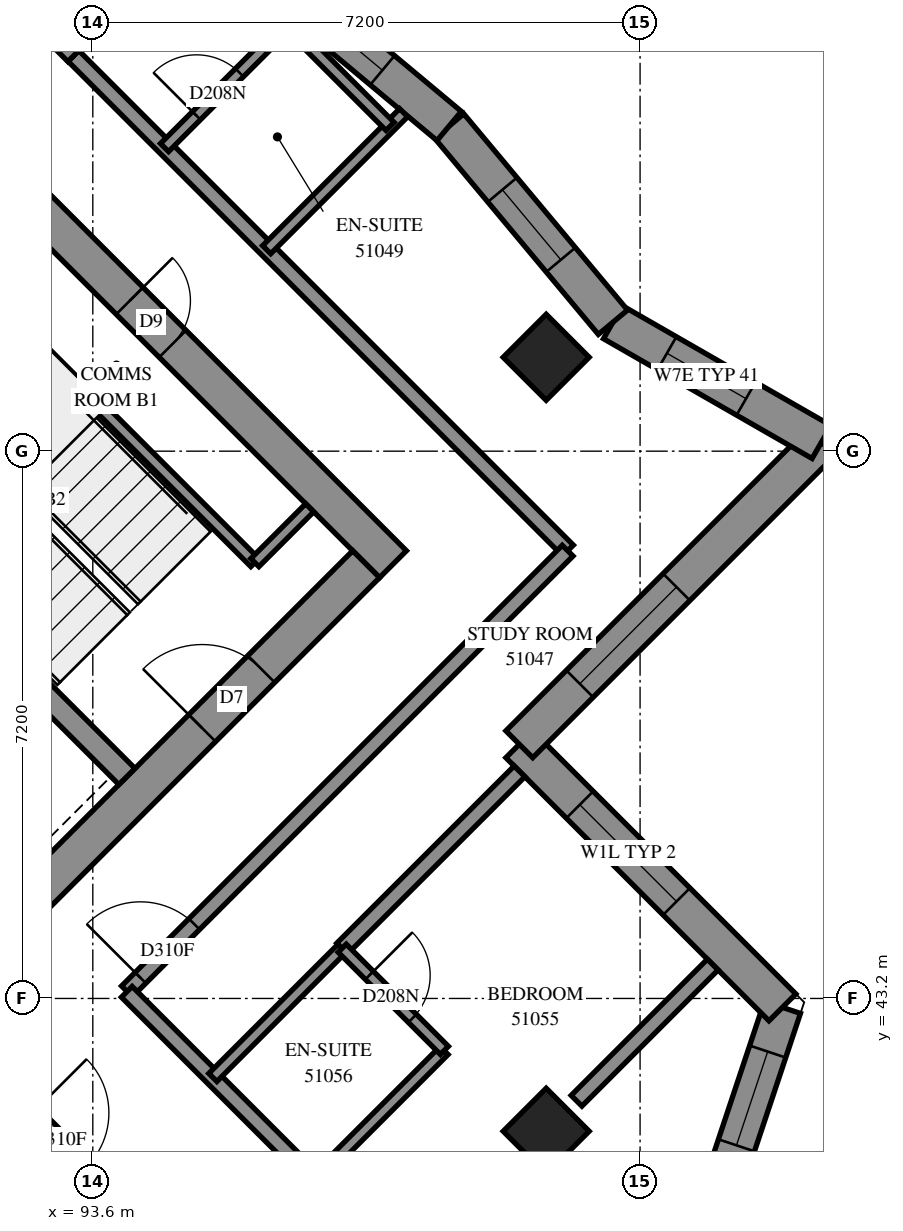
"""IFC4 building model, lengths in metres.
Left out: names, types, materials, properties, quantities, classifications, styles, units other than length and angle.
Written with IfcOpenShell. Run it as: python <this file> out.ifc"""

import sys

from ifc_helpers import new_model, si_unit, direction, frame, frame_2d, origin, origin_2d, place, context, subcontext, project, spatial, polyline, rectangle, outline, extrude, element, fill, save


model = new_model("IFC4")
c1 = context("Model", 3, precision=1e-05, world=origin(), true_north=direction((0.0, 1.0)))
c2 = subcontext(c1, "Body", "Model", "MODEL_VIEW")
j1 = project(units=[si_unit("LENGTHUNIT", "METRE"), si_unit("PLANEANGLEUNIT", "RADIAN")], contexts=[c1])
p1 = place(None, origin())
s1 = spatial("IfcSite", under=j1, at=p1, CompositionType="ELEMENT")
p2 = place(p1, origin())
s2 = spatial("IfcBuilding", under=s1, at=p2, CompositionType="ELEMENT")
p3 = place(p2, frame((0.0, 0.0, 189.6)))
s3 = spatial("IfcBuildingStorey", under=s2, at=p3, CompositionType="ELEMENT", Elevation=189.6)
for number, where, z_axis, x_axis in (
    (1, (99.565, 51.635, 0.0), (0.0, 0.0, 1.0), (0.707, -0.707, 0.0)),
    (2, (99.565, 41.453, 0.0), (0.0, 0.0, 1.0), (0.707, -0.707, 0.0)),
):
    element("IfcColumn", number, at=place(p3, frame(where, z_axis=z_axis, x_axis=x_axis)), inside=s3, PredefinedType="COLUMN", context=c2, shape_type="SweptSolid", body=[
        extrude(rectangle(XDim=0.8, YDim=0.8, at=origin_2d()), origin(), (0.0, 0.0, 1.0), 3.1),
    ])
p4 = place(p3, frame((86.66, 59.802, -0.3), z_axis=(0.0, 0.0, 1.0), x_axis=(0.7071067812, -0.7071067812, 0.0)))
e3 = element("IfcWall", 3, at=p4, inside=s3, PredefinedType="SHEAR", context=c2, shape_type="SweptSolid", body=[
    extrude(rectangle(XDim=15.4, YDim=0.5, at=frame_2d((7.7, 0.0))), origin(), (0.0, 0.0, 1.0), 2.7),
])
p5 = place(p4, frame((10.5, 0.0, 0.3)))
e4 = element("IfcOpeningElement", 4, at=p5, cuts=e3, PredefinedType="OPENING", context=c2, shape_type="SweptSolid", body=[
    extrude(rectangle(XDim=0.8, YDim=2.1, at=frame_2d((0.4, 1.05))), frame((0.0, 0.26, 0.0), z_axis=(0.0, -1.0, 0.0), x_axis=(1.0, 0.0, 0.0)), (0.0, 0.0, 1.0), 0.52),
])
p6 = place(p3, frame((87.013, 38.731, -0.3), z_axis=(0.0, 0.0, 1.0), x_axis=(0.7071067812, 0.7071067812, 0.0)))
e5 = element("IfcWall", 5, at=p6, inside=s3, PredefinedType="SHEAR", context=c2, shape_type="SweptSolid", body=[
    extrude(rectangle(XDim=14.4, YDim=0.5, at=frame_2d((7.2, 0.0))), origin(), (0.0, 0.0, 1.0), 2.7),
])
p7 = place(p6, frame((4.55, 0.0, 0.3)))
e6 = element("IfcOpeningElement", 6, at=p7, cuts=e5, PredefinedType="OPENING", context=c2, shape_type="SweptSolid", body=[
    extrude(rectangle(XDim=1.1, YDim=2.1, at=frame_2d((0.55, 1.05))), frame((0.0, 0.26, 0.0), z_axis=(0.0, -1.0, 0.0), x_axis=(1.0, 0.0, 0.0)), (0.0, 0.0, 1.0), 0.52),
])
p8 = place(p6, frame((11.35, 0.0, 0.3)))
e7 = element("IfcOpeningElement", 7, at=p8, cuts=e5, PredefinedType="OPENING", context=c2, shape_type="SweptSolid", body=[
    extrude(rectangle(XDim=1.1, YDim=2.1, at=frame_2d((0.55, 1.05))), frame((0.0, 0.26, 0.0), z_axis=(0.0, -1.0, 0.0), x_axis=(1.0, 0.0, 0.0)), (0.0, 0.0, 1.0), 0.52),
])
p9 = place(p3, frame((88.958, 51.211, 0.0), z_axis=(0.0, 0.0, 1.0), x_axis=(0.7070998367, -0.7071137256, 0.0)))
e8 = element("IfcWall", 8, at=p9, inside=s3, PredefinedType="SOLIDWALL", context=c2, shape_type="SweptSolid", body=[
    extrude(rectangle(XDim=7.2, YDim=0.3, at=frame_2d((3.6, 0.0))), origin(), (0.0, 0.0, 1.0), 3.1),
])
p10 = place(p3, frame((101.062, 38.252, 0.0), z_axis=(0.0, 0.0, 1.0), x_axis=(0.3162395484, 0.9486793705, 0.0)))
e9 = element("IfcWall", 9, at=p10, inside=s3, PredefinedType="SOLIDWALL", context=c2, shape_type="SweptSolid", body=[
    extrude(outline(polyline([(-0.12, -0.25), (5.247, -0.25), (4.938, 0.25), (0.12, 0.25), (-0.12, -0.25)])), origin(), (0.0, 0.0, 1.0), 3.1),
])
p11 = place(p10, frame((1.68, 0.0, 0.45)))
e10 = element("IfcOpeningElement", 10, at=p11, cuts=e9, PredefinedType="OPENING", context=c2, shape_type="SweptSolid", body=[
    extrude(rectangle(XDim=1.3, YDim=2.5, at=frame_2d((0.65, 1.25))), frame((0.0, 0.26, 0.0), z_axis=(0.0, -1.0, 0.0), x_axis=(1.0, 0.0, 0.0)), (0.0, 0.0, 1.0), 0.52),
])
p12 = place(p10, frame((3.18, 0.0, 0.45)))
e11 = element("IfcOpeningElement", 11, at=p12, cuts=e9, PredefinedType="OPENING", context=c2, shape_type="SweptSolid", body=[
    extrude(rectangle(XDim=1.3, YDim=2.5, at=frame_2d((0.65, 1.25))), frame((0.0, 0.26, 0.0), z_axis=(0.0, -1.0, 0.0), x_axis=(1.0, 0.0, 0.0)), (0.0, 0.0, 1.0), 0.52),
])
p13 = place(p3, frame((102.673, 43.083, 0.0), z_axis=(0.0, 0.0, 1.0), x_axis=(-0.7071067812, 0.7071067812, 0.0)))
e12 = element("IfcWall", 12, at=p13, inside=s3, PredefinedType="SOLIDWALL", context=c2, shape_type="SweptSolid", body=[
    extrude(outline(polyline([(-0.154, -0.25), (4.646, -0.25), (5.146, 0.25), (0.154, 0.25), (-0.154, -0.25)])), origin(), (0.0, 0.0, 1.0), 3.1),
])
p14 = place(p13, frame((1.97, 0.0, 0.6)))
e13 = element("IfcOpeningElement", 13, at=p14, cuts=e12, PredefinedType="OPENING", context=c2, shape_type="SweptSolid", body=[
    extrude(rectangle(XDim=1.8, YDim=1.9, at=frame_2d((0.9, 0.95))), frame((0.0, 0.26, 0.0), z_axis=(0.0, -1.0, 0.0), x_axis=(1.0, 0.0, 0.0)), (0.0, 0.0, 1.0), 0.52),
])
p15 = place(p3, frame((99.211, 46.544, 0.0), z_axis=(0.0, 0.0, 1.0), x_axis=(0.7071156725, 0.7070978897, 0.0)))
e14 = element("IfcWall", 14, at=p15, inside=s3, PredefinedType="SOLIDWALL", context=c2, shape_type="SweptSolid", body=[
    extrude(outline(polyline([(0.25, -0.25), (5.95, -0.25), (5.297, 0.25), (-0.25, 0.25), (0.25, -0.25)])), origin(), (0.0, 0.0, 1.0), 3.1),
])
p16 = place(p15, frame((1.125, 0.0, 0.6)))
e15 = element("IfcOpeningElement", 15, at=p16, cuts=e14, PredefinedType="OPENING", context=c2, shape_type="SweptSolid", body=[
    extrude(rectangle(XDim=1.8, YDim=1.9, at=frame_2d((0.9, 0.95))), frame((0.0, 0.26, 0.0), z_axis=(0.0, -1.0, 0.0), x_axis=(1.0, 0.0, 0.0)), (0.0, 0.0, 1.0), 0.52),
])
p17 = place(p3, frame((103.188, 50.52, 0.0), z_axis=(0.0, 0.0, 1.0), x_axis=(-0.8672184807, 0.4979278127, 0.0)))
e16 = element("IfcWall", 16, at=p17, inside=s3, PredefinedType="SOLIDWALL", context=c2, shape_type="SweptSolid", body=[
    extrude(outline(polyline([(-0.327, -0.25), (3.12, -0.25), (3.209, 0.25), (0.327, 0.25), (-0.327, -0.25)])), origin(), (0.0, 0.0, 1.0), 3.1),
])
p18 = place(p17, frame((1.146, 0.0, 0.45)))
e17 = element("IfcOpeningElement", 17, at=p18, cuts=e16, PredefinedType="OPENING", context=c2, shape_type="SweptSolid", body=[
    extrude(rectangle(XDim=1.2, YDim=2.5, at=frame_2d((0.6, 1.25))), frame((0.0, 0.26, 0.0), z_axis=(0.0, -1.0, 0.0), x_axis=(1.0, 0.0, 0.0)), (0.0, 0.0, 1.0), 0.52),
])
p19 = place(p3, frame((100.443, 52.096, 0.0), z_axis=(0.0, 0.0, 1.0), x_axis=(-0.6407429217, 0.7677555003, 0.0)))
e18 = element("IfcWall", 18, at=p19, inside=s3, PredefinedType="SOLIDWALL", context=c2, shape_type="SweptSolid", body=[
    extrude(outline(polyline([(0.045, -0.25), (3.385, -0.25), (3.34, 0.25), (-0.045, 0.25), (0.045, -0.25)])), origin(), (0.0, 0.0, 1.0), 3.1),
])
p20 = place(p19, frame((1.07, 0.0, 0.45)))
e19 = element("IfcOpeningElement", 19, at=p20, cuts=e18, PredefinedType="OPENING", context=c2, shape_type="SweptSolid", body=[
    extrude(rectangle(XDim=1.2, YDim=2.5, at=frame_2d((0.6, 1.25))), frame((0.0, 0.26, 0.0), z_axis=(0.0, -1.0, 0.0), x_axis=(1.0, 0.0, 0.0)), (0.0, 0.0, 1.0), 0.52),
])
p21 = place(p3, frame((98.288, 54.678, 0.0), z_axis=(0.0, 0.0, 1.0), x_axis=(-0.7677573222, 0.6407407387, 0.0)))
e20 = element("IfcWall", 20, at=p21, inside=s3, PredefinedType="SOLIDWALL", context=c2, shape_type="SweptSolid", body=[
    extrude(outline(polyline([(-0.022, -0.25), (3.318, -0.25), (3.363, 0.25), (0.022, 0.25), (-0.022, -0.25)])), origin(), (0.0, 0.0, 1.0), 3.1),
])
p22 = place(p21, frame((1.144, 0.0, 0.45)))
e21 = element("IfcOpeningElement", 21, at=p22, cuts=e20, PredefinedType="OPENING", context=c2, shape_type="SweptSolid", body=[
    extrude(rectangle(XDim=1.2, YDim=2.5, at=frame_2d((0.6, 1.25))), frame((0.0, 0.26, 0.0), z_axis=(0.0, -1.0, 0.0), x_axis=(1.0, 0.0, 0.0)), (0.0, 0.0, 1.0), 0.52),
])
p23 = place(p3, frame((91.313, 53.354, 0.0), z_axis=(0.0, 0.0, 1.0), x_axis=(0.7071147811, -0.7070987812, 0.0)))
e22 = element("IfcWall", 22, at=p23, inside=s3, PredefinedType="PARTITIONING", context=c2, shape_type="SweptSolid", body=[
    extrude(rectangle(XDim=6.25, YDim=0.15, at=frame_2d((3.125, 0.0))), origin(), (0.0, 0.0, 1.0), 3.1),
])
p24 = place(p3, frame((95.732, 48.934, 0.0), z_axis=(0.0, 0.0, 1.0), x_axis=(0.7071067812, 0.7071067812, 0.0)))
e23 = element("IfcWall", 23, at=p24, inside=s3, PredefinedType="PARTITIONING", context=c2, shape_type="SweptSolid", body=[
    extrude(rectangle(XDim=1.02, YDim=0.15, at=frame_2d((0.51, 0.0))), origin(), (0.0, 0.0, 1.0), 3.1),
])
p25 = place(p3, frame((93.346, 55.599, 0.0), z_axis=(0.0, 0.0, 1.0), x_axis=(0.7071067812, -0.7071067812, 0.0)))
e24 = element("IfcWall", 24, at=p25, inside=s3, PredefinedType="PARTITIONING", context=c2, shape_type="SweptSolid", body=[
    extrude(rectangle(XDim=9.201, YDim=0.2, at=frame_2d((4.601, 0.0))), origin(), (0.0, 0.0, 1.0), 3.1),
])
p26 = place(p3, frame((94.049, 43.293, 0.0), z_axis=(0.0, 0.0, 1.0), x_axis=(0.7071067812, 0.7071067812, 0.0)))
e25 = element("IfcWall", 25, at=p26, inside=s3, PredefinedType="PARTITIONING", context=c2, shape_type="SweptSolid", body=[
    extrude(rectangle(XDim=8.2, YDim=0.2, at=frame_2d((4.1, 0.0))), origin(), (0.0, 0.0, 1.0), 3.1),
])
p27 = place(p26, frame((0.252, 0.0, 0.0)))
e26 = element("IfcOpeningElement", 26, at=p27, cuts=e25, PredefinedType="OPENING", context=c2, shape_type="SweptSolid", body=[
    extrude(rectangle(XDim=1.0, YDim=2.1, at=frame_2d((0.5, 1.05))), frame((0.0, 0.11, 0.0), z_axis=(0.0, -1.0, 0.0), x_axis=(1.0, 0.0, 0.0)), (0.0, 0.0, 1.0), 0.22),
])
p28 = place(p3, frame((94.047, 43.287, 0.0), z_axis=(0.0, 0.0, 1.0), x_axis=(0.7071067812, -0.7071067812, 0.0)))
e27 = element("IfcWall", 27, at=p28, inside=s3, PredefinedType="PARTITIONING", context=c2, shape_type="SweptSolid", body=[
    extrude(rectangle(XDim=5.199, YDim=0.2, at=frame_2d((2.599, 0.0))), origin(), (0.0, 0.0, 1.0), 3.1),
])
p29 = place(p28, frame((3.898, 0.0, 0.0)))
e28 = element("IfcOpeningElement", 28, at=p29, cuts=e27, PredefinedType="OPENING", context=c2, shape_type="SweptSolid", body=[
    extrude(rectangle(XDim=0.9, YDim=2.1, at=frame_2d((0.45, 1.05))), frame((0.0, 0.11, 0.0), z_axis=(0.0, -1.0, 0.0), x_axis=(1.0, 0.0, 0.0)), (0.0, 0.0, 1.0), 0.22),
])
p30 = place(p3, frame((92.633, 41.873, 0.0), z_axis=(0.0, 0.0, 1.0), x_axis=(0.7071067812, -0.7071067812, 0.0)))
e29 = element("IfcWall", 29, at=p30, inside=s3, PredefinedType="PARTITIONING", context=c2, shape_type="SweptSolid", body=[
    extrude(rectangle(XDim=5.199, YDim=0.2, at=frame_2d((2.599, 0.0))), origin(), (0.0, 0.0, 1.0), 3.1),
])
p31 = place(p30, frame((0.253, 0.0, 0.0)))
e30 = element("IfcOpeningElement", 30, at=p31, cuts=e29, PredefinedType="OPENING", context=c2, shape_type="SweptSolid", body=[
    extrude(rectangle(XDim=1.0, YDim=2.1, at=frame_2d((0.5, 1.05))), frame((0.0, 0.11, 0.0), z_axis=(0.0, -1.0, 0.0), x_axis=(1.0, 0.0, 0.0)), (0.0, 0.0, 1.0), 0.22),
])
p32 = place(p30, frame((3.948, 0.0, 0.0)))
e31 = element("IfcOpeningElement", 31, at=p32, cuts=e29, PredefinedType="OPENING", context=c2, shape_type="SweptSolid", body=[
    extrude(rectangle(XDim=0.9, YDim=2.1, at=frame_2d((0.45, 1.05))), frame((0.0, 0.11, 0.0), z_axis=(0.0, -1.0, 0.0), x_axis=(1.0, 0.0, 0.0)), (0.0, 0.0, 1.0), 0.22),
])
p33 = place(p3, frame((96.88, 43.856, 0.0), z_axis=(0.0, 0.0, 1.0), x_axis=(0.7074098182, 0.7068036142, 0.0)))
e32 = element("IfcWall", 32, at=p33, inside=s3, PredefinedType="PARTITIONING", context=c2, shape_type="SweptSolid", body=[
    extrude(rectangle(XDim=3.299, YDim=0.2, at=frame_2d((1.65, 0.0))), origin(), (0.0, 0.0, 1.0), 3.1),
])
p34 = place(p3, frame((95.887, 53.051, 0.0), z_axis=(0.0, 0.0, 1.0), x_axis=(0.7071067812, 0.7071067812, 0.0)))
e33 = element("IfcWall", 33, at=p34, inside=s3, PredefinedType="PARTITIONING", context=c2, shape_type="SweptSolid", body=[
    extrude(rectangle(XDim=2.548, YDim=0.15, at=frame_2d((1.274, 0.0))), origin(), (0.0, 0.0, 1.0), 3.1),
])
p35 = place(p3, frame((99.964, 41.854, 0.0), z_axis=(0.0, 0.0, 1.0), x_axis=(0.7071265121, 0.7070870497, 0.0)))
e34 = element("IfcWall", 34, at=p35, inside=s3, PredefinedType="PARTITIONING", context=c2, shape_type="SweptSolid", body=[
    extrude(rectangle(XDim=2.534, YDim=0.2, at=frame_2d((1.267, 0.0))), origin(), (0.0, 0.0, 1.0), 3.1),
])
for number, where, z_axis, x_axis in (
    (35, (96.523, 40.817, 0.0), (0.0, 0.0, 1.0), (0.707, 0.707, 0.0)),
    (36, (95.179, 42.161, 0.0), (0.0, 0.0, 1.0), (0.707, 0.707, 0.0)),
):
    element("IfcWall", number, at=place(p3, frame(where, z_axis=z_axis, x_axis=x_axis)), inside=s3, PredefinedType="PARTITIONING", context=c2, shape_type="SweptSolid", body=[
        extrude(rectangle(XDim=2.401, YDim=0.15, at=frame_2d((1.201, 0.0))), origin(), (0.0, 0.0, 1.0), 3.1),
    ])
p36 = place(p3, frame((94.544, 54.394, 0.0), z_axis=(0.0, 0.0, 1.0), x_axis=(0.7070857442, 0.7071278176, 0.0)))
e37 = element("IfcWall", 37, at=p36, inside=s3, PredefinedType="PARTITIONING", context=c2, shape_type="SweptSolid", body=[
    extrude(rectangle(XDim=2.377, YDim=0.15, at=frame_2d((1.188, 0.0))), origin(), (0.0, 0.0, 1.0), 3.1),
])
p37 = place(p36, frame((0.594, 0.0, 0.0)))
e38 = element("IfcOpeningElement", 38, at=p37, cuts=e37, PredefinedType="OPENING", context=c2, shape_type="SweptSolid", body=[
    extrude(rectangle(XDim=0.8, YDim=2.1, at=frame_2d((0.4, 1.05))), frame((0.0, 0.085, 0.0), z_axis=(0.0, -1.0, 0.0), x_axis=(1.0, 0.0, 0.0)), (0.0, 0.0, 1.0), 0.17),
])
p38 = place(p3, frame((96.881, 43.861, 0.0), z_axis=(0.0, 0.0, 1.0), x_axis=(0.7071067812, -0.7071067812, 0.0)))
e39 = element("IfcWall", 39, at=p38, inside=s3, PredefinedType="PARTITIONING", context=c2, shape_type="SweptSolid", body=[
    extrude(rectangle(XDim=1.901, YDim=0.15, at=frame_2d((0.95, 0.0))), origin(), (0.0, 0.0, 1.0), 3.1),
])
p39 = place(p38, frame((0.505, 0.0, 0.0)))
e40 = element("IfcOpeningElement", 40, at=p39, cuts=e39, PredefinedType="OPENING", context=c2, shape_type="SweptSolid", body=[
    extrude(rectangle(XDim=0.8, YDim=2.1, at=frame_2d((0.4, 1.05))), frame((0.0, 0.085, 0.0), z_axis=(0.0, -1.0, 0.0), x_axis=(1.0, 0.0, 0.0)), (0.0, 0.0, 1.0), 0.17),
])
p40 = place(p3, frame((96.191, 55.993, 0.0), z_axis=(0.0, 0.0, 1.0), x_axis=(0.7071067812, -0.7071067812, 0.0)))
e41 = element("IfcWall", 41, at=p40, inside=s3, PredefinedType="PARTITIONING", context=c2, shape_type="SweptSolid", body=[
    extrude(rectangle(XDim=1.867, YDim=0.15, at=frame_2d((0.933, 0.0))), origin(), (0.0, 0.0, 1.0), 3.1),
])
p41 = place(p3, frame((92.311, 56.627, 0.0), z_axis=(0.0, 0.0, 1.0), x_axis=(0.7077922938, -0.7064206033, 0.0)))
e42 = element("IfcWall", 42, at=p41, inside=s3, PredefinedType="PARTITIONING", context=c2, shape_type="SweptSolid", body=[
    extrude(rectangle(XDim=1.458, YDim=0.2, at=frame_2d((0.729, 0.0))), origin(), (0.0, 0.0, 1.0), 3.1),
])
p42 = place(p12, origin())
e43 = element("IfcWindow", 43, at=p42, inside=s3, PartitioningType="SINGLE_PANEL", PredefinedType="WINDOW", context=c2, shape_type="SweptSolid", body=[
    extrude(rectangle(XDim=1.3, YDim=2.5, at=frame_2d((0.65, 1.25))), frame((0.0, 0.18, 0.0), z_axis=(0.0, -1.0, 0.0), x_axis=(1.0, 0.0, 0.0)), (0.0, 0.0, 1.0), 0.06),
])
fill(e11, e43)
p43 = place(p14, origin())
e44 = element("IfcWindow", 44, at=p43, inside=s3, PartitioningType="SINGLE_PANEL", PredefinedType="WINDOW", context=c2, shape_type="SweptSolid", body=[
    extrude(rectangle(XDim=1.8, YDim=1.9, at=frame_2d((0.9, 0.95))), frame((0.0, 0.18, 0.0), z_axis=(0.0, -1.0, 0.0), x_axis=(1.0, 0.0, 0.0)), (0.0, 0.0, 1.0), 0.06),
])
fill(e13, e44)
p44 = place(p16, origin())
e45 = element("IfcWindow", 45, at=p44, inside=s3, PartitioningType="SINGLE_PANEL", PredefinedType="WINDOW", context=c2, shape_type="SweptSolid", body=[
    extrude(rectangle(XDim=1.8, YDim=1.9, at=frame_2d((0.9, 0.95))), frame((0.0, 0.18, 0.0), z_axis=(0.0, -1.0, 0.0), x_axis=(1.0, 0.0, 0.0)), (0.0, 0.0, 1.0), 0.06),
])
fill(e15, e45)
p45 = place(p18, origin())
e46 = element("IfcWindow", 46, at=p45, inside=s3, PartitioningType="SINGLE_PANEL", PredefinedType="WINDOW", context=c2, shape_type="SweptSolid", body=[
    extrude(rectangle(XDim=1.2, YDim=2.5, at=frame_2d((0.6, 1.25))), frame((0.0, 0.18, 0.0), z_axis=(0.0, -1.0, 0.0), x_axis=(1.0, 0.0, 0.0)), (0.0, 0.0, 1.0), 0.06),
])
fill(e17, e46)
p46 = place(p20, origin())
e47 = element("IfcWindow", 47, at=p46, inside=s3, PartitioningType="SINGLE_PANEL", PredefinedType="WINDOW", context=c2, shape_type="SweptSolid", body=[
    extrude(rectangle(XDim=1.2, YDim=2.5, at=frame_2d((0.6, 1.25))), frame((0.0, 0.18, 0.0), z_axis=(0.0, -1.0, 0.0), x_axis=(1.0, 0.0, 0.0)), (0.0, 0.0, 1.0), 0.06),
])
fill(e19, e47)
p47 = place(p22, origin())
e48 = element("IfcWindow", 48, at=p47, inside=s3, PartitioningType="SINGLE_PANEL", PredefinedType="WINDOW", context=c2, shape_type="SweptSolid", body=[
    extrude(rectangle(XDim=1.2, YDim=2.5, at=frame_2d((0.6, 1.25))), frame((0.0, 0.18, 0.0), z_axis=(0.0, -1.0, 0.0), x_axis=(1.0, 0.0, 0.0)), (0.0, 0.0, 1.0), 0.06),
])
fill(e21, e48)
p48 = place(p5, origin())
e49 = element("IfcDoor", 49, at=p48, inside=s3, OperationType="SINGLE_SWING_RIGHT", PredefinedType="DOOR", context=c2, shape_type="SweptSolid", body=[
    extrude(rectangle(XDim=0.8, YDim=2.1, at=frame_2d((0.4, 1.05))), frame((0.0, 0.025, 0.0), z_axis=(0.0, -1.0, 0.0), x_axis=(1.0, 0.0, 0.0)), (0.0, 0.0, 1.0), 0.05),
])
fill(e4, e49)
p49 = place(p8, origin())
e50 = element("IfcDoor", 50, at=p49, inside=s3, OperationType="SINGLE_SWING_RIGHT", PredefinedType="DOOR", context=c2, shape_type="SweptSolid", body=[
    extrude(rectangle(XDim=1.1, YDim=2.1, at=frame_2d((0.55, 1.05))), frame((0.0, 0.025, 0.0), z_axis=(0.0, -1.0, 0.0), x_axis=(1.0, 0.0, 0.0)), (0.0, 0.0, 1.0), 0.05),
])
fill(e7, e50)
p50 = place(p27, origin())
e51 = element("IfcDoor", 51, at=p50, inside=s3, OperationType="SINGLE_SWING_RIGHT", PredefinedType="DOOR", context=c2, shape_type="SweptSolid", body=[
    extrude(rectangle(XDim=1.0, YDim=2.1, at=frame_2d((0.5, 1.05))), frame((0.0, 0.025, 0.0), z_axis=(0.0, -1.0, 0.0), x_axis=(1.0, 0.0, 0.0)), (0.0, 0.0, 1.0), 0.05),
])
fill(e26, e51)
p51 = place(p37, origin())
e52 = element("IfcDoor", 52, at=p51, inside=s3, OperationType="SINGLE_SWING_RIGHT", PredefinedType="DOOR", context=c2, shape_type="SweptSolid", body=[
    extrude(rectangle(XDim=0.8, YDim=2.1, at=frame_2d((0.4, 1.05))), frame((0.0, 0.025, 0.0), z_axis=(0.0, -1.0, 0.0), x_axis=(1.0, 0.0, 0.0)), (0.0, 0.0, 1.0), 0.05),
])
fill(e38, e52)
p52 = place(p31, origin())
e53 = element("IfcDoor", 53, at=p52, inside=s3, OperationType="SINGLE_SWING_RIGHT", PredefinedType="DOOR", context=c2, shape_type="SweptSolid", body=[
    extrude(rectangle(XDim=1.0, YDim=2.1, at=frame_2d((0.5, 1.05))), frame((0.0, 0.025, 0.0), z_axis=(0.0, -1.0, 0.0), x_axis=(1.0, 0.0, 0.0)), (0.0, 0.0, 1.0), 0.05),
])
fill(e30, e53)
p53 = place(p39, origin())
e54 = element("IfcDoor", 54, at=p53, inside=s3, OperationType="SINGLE_SWING_RIGHT", PredefinedType="DOOR", context=c2, shape_type="SweptSolid", body=[
    extrude(rectangle(XDim=0.8, YDim=2.1, at=frame_2d((0.4, 1.05))), frame((0.0, 0.025, 0.0), z_axis=(0.0, -1.0, 0.0), x_axis=(1.0, 0.0, 0.0)), (0.0, 0.0, 1.0), 0.05),
])
fill(e40, e54)
save(model, sys.argv[1])
